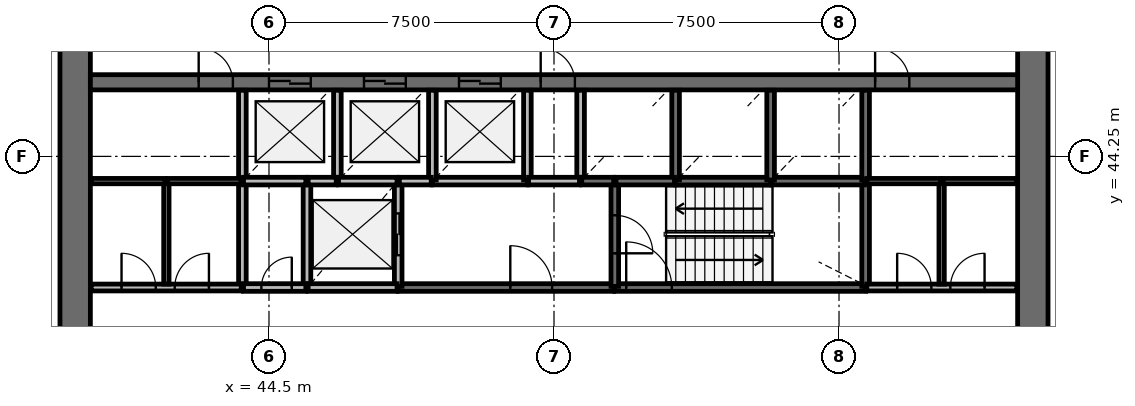
"""IFC4 building model, lengths in metres.
Left out: names, types, materials, properties, quantities, classifications, styles, units other than length and angle.
Written with IfcOpenShell. Run it as: python <this file> out.ifc"""

import sys

from ifc_helpers import new_model, si_unit, direction, frame, frame_2d, origin, place, context, subcontext, project, spatial, rectangle, extrude, source, transform, mapped, element, fill, save


model = new_model("IFC4")
c1 = context("Model", 3, precision=1e-05, world=origin(), true_north=direction((0.0, 1.0)))
c2 = subcontext(c1, "Body", "Model", "MODEL_VIEW")
j1 = project(units=[si_unit("LENGTHUNIT", "METRE"), si_unit("PLANEANGLEUNIT", "RADIAN")], contexts=[c1])
p1 = place(None, origin())
s1 = spatial("IfcSite", under=j1, at=p1, CompositionType="ELEMENT")
p2 = place(p1, origin())
s2 = spatial("IfcBuilding", under=s1, at=p2, CompositionType="ELEMENT")
p3 = place(p2, frame((0.0, 0.0, 88.0)))
s3 = spatial("IfcBuildingStorey", under=s2, at=p3, CompositionType="ELEMENT", Elevation=88.0)
p4 = place(p3, frame((64.6, 38.0, 0.0), z_axis=(0.0, 0.0, 1.0), x_axis=(0.0, 1.0, 0.0)))
e1 = element("IfcWall", 1, at=p4, inside=s3, PredefinedType="SHEAR", context=c2, shape_type="SweptSolid", body=[
    extrude(rectangle(XDim=20.0, YDim=0.8, at=frame_2d((10.0, 0.0))), origin(), (0.0, 0.0, 1.0), 4.1),
])
p5 = place(p4, frame((9.1, 0.0, 0.0)))
e2 = element("IfcOpeningElement", 2, at=p5, cuts=e1, PredefinedType="OPENING", context=c2, shape_type="SweptSolid", body=[
    extrude(rectangle(XDim=1.8, YDim=2.1, at=frame_2d((0.9, 1.05))), frame((0.0, 0.41, 0.0), z_axis=(0.0, -1.0, 0.0), x_axis=(1.0, 0.0, 0.0)), (0.0, 0.0, 1.0), 0.82),
])
p6 = place(p3, frame((39.4, 58.0, 0.0), z_axis=(0.0, 0.0, 1.0), x_axis=(0.0, -1.0, 0.0)))
e3 = element("IfcWall", 3, at=p6, inside=s3, PredefinedType="SHEAR", context=c2, shape_type="SweptSolid", body=[
    extrude(rectangle(XDim=20.0, YDim=0.8, at=frame_2d((10.0, 0.0))), origin(), (0.0, 0.0, 1.0), 4.1),
])
p7 = place(p6, frame((9.1, 0.0, 0.0)))
e4 = element("IfcOpeningElement", 4, at=p7, cuts=e3, PredefinedType="OPENING", context=c2, shape_type="SweptSolid", body=[
    extrude(rectangle(XDim=1.8, YDim=2.1, at=frame_2d((0.9, 1.05))), frame((0.0, 0.41, 0.0), z_axis=(0.0, -1.0, 0.0), x_axis=(1.0, 0.0, 0.0)), (0.0, 0.0, 1.0), 0.82),
])
p8 = place(p3, frame((39.8, 46.2, 0.0), z_axis=(0.0, 0.0, 1.0), x_axis=(1.0, 0.0, 0.0)))
e5 = element("IfcWall", 5, at=p8, inside=s3, PredefinedType="SHEAR", context=c2, shape_type="SweptSolid", body=[
    extrude(rectangle(XDim=24.4, YDim=0.4, at=frame_2d((12.2, 0.0))), origin(), (0.0, 0.0, 1.0), 4.1),
])
p9 = place(p8, frame((4.7, 0.0, 0.0)))
e6 = element("IfcOpeningElement", 6, at=p9, cuts=e5, PredefinedType="OPENING", context=c2, shape_type="SweptSolid", body=[
    extrude(rectangle(XDim=1.1, YDim=2.1, at=frame_2d((0.55, 1.05))), frame((0.0, 0.21, 0.0), z_axis=(0.0, -1.0, 0.0), x_axis=(1.0, 0.0, 0.0)), (0.0, 0.0, 1.0), 0.42),
])
p10 = place(p8, frame((7.2, 0.0, 0.0)))
e7 = element("IfcOpeningElement", 7, at=p10, cuts=e5, PredefinedType="OPENING", context=c2, shape_type="SweptSolid", body=[
    extrude(rectangle(XDim=1.1, YDim=2.1, at=frame_2d((0.55, 1.05))), frame((0.0, 0.21, 0.0), z_axis=(0.0, -1.0, 0.0), x_axis=(1.0, 0.0, 0.0)), (0.0, 0.0, 1.0), 0.42),
])
p11 = place(p8, frame((9.7, 0.0, 0.0)))
e8 = element("IfcOpeningElement", 8, at=p11, cuts=e5, PredefinedType="OPENING", context=c2, shape_type="SweptSolid", body=[
    extrude(rectangle(XDim=1.1, YDim=2.1, at=frame_2d((0.55, 1.05))), frame((0.0, 0.21, 0.0), z_axis=(0.0, -1.0, 0.0), x_axis=(1.0, 0.0, 0.0)), (0.0, 0.0, 1.0), 0.42),
])
p12 = place(p8, frame((20.65, 0.0, 0.0)))
e9 = element("IfcOpeningElement", 9, at=p12, cuts=e5, PredefinedType="OPENING", context=c2, shape_type="SweptSolid", body=[
    extrude(rectangle(XDim=0.9, YDim=2.1, at=frame_2d((0.45, 1.05))), frame((0.0, 0.21, 0.0), z_axis=(0.0, -1.0, 0.0), x_axis=(1.0, 0.0, 0.0)), (0.0, 0.0, 1.0), 0.42),
])
p13 = place(p8, frame((2.85, 0.0, 0.0)))
e10 = element("IfcOpeningElement", 10, at=p13, cuts=e5, PredefinedType="OPENING", context=c2, shape_type="SweptSolid", body=[
    extrude(rectangle(XDim=0.9, YDim=2.1, at=frame_2d((0.45, 1.05))), frame((0.0, 0.21, 0.0), z_axis=(0.0, -1.0, 0.0), x_axis=(1.0, 0.0, 0.0)), (0.0, 0.0, 1.0), 0.42),
])
p14 = place(p8, frame((11.85, 0.0, 0.0)))
e11 = element("IfcOpeningElement", 11, at=p14, cuts=e5, PredefinedType="OPENING", context=c2, shape_type="SweptSolid", body=[
    extrude(rectangle(XDim=0.9, YDim=2.1, at=frame_2d((0.45, 1.05))), frame((0.0, 0.21, 0.0), z_axis=(0.0, -1.0, 0.0), x_axis=(1.0, 0.0, 0.0)), (0.0, 0.0, 1.0), 0.42),
])
p15 = place(p3, frame((53.6, 40.8, 0.0), z_axis=(0.0, 0.0, 1.0), x_axis=(1.0, 0.0, 0.0)))
e12 = element("IfcWall", 12, at=p15, inside=s3, PredefinedType="SOLIDWALL", context=c2, shape_type="SweptSolid", body=[
    extrude(rectangle(XDim=6.6, YDim=0.2, at=frame_2d((3.3, 0.0))), origin(), (0.0, 0.0, 1.0), 3.7),
])
p16 = place(p15, frame((0.3, 0.0, 0.0)))
e13 = element("IfcOpeningElement", 13, at=p16, cuts=e12, PredefinedType="OPENING", context=c2, shape_type="SweptSolid", body=[
    extrude(rectangle(XDim=1.2, YDim=2.1, at=frame_2d((0.6, 1.05))), frame((0.0, 0.11, 0.0), z_axis=(0.0, -1.0, 0.0), x_axis=(1.0, 0.0, 0.0)), (0.0, 0.0, 1.0), 0.22),
])
p17 = place(p3, frame((47.9, 40.8, 0.0), z_axis=(0.0, 0.0, 1.0), x_axis=(1.0, 0.0, 0.0)))
e14 = element("IfcWall", 14, at=p17, inside=s3, PredefinedType="SOLIDWALL", context=c2, shape_type="SweptSolid", body=[
    extrude(rectangle(XDim=5.67, YDim=0.2, at=frame_2d((2.835, 0.0))), origin(), (0.0, 0.0, 1.0), 3.7),
])
p18 = place(p17, frame((2.95, 0.0, 0.0)))
e15 = element("IfcOpeningElement", 15, at=p18, cuts=e14, PredefinedType="OPENING", context=c2, shape_type="SweptSolid", body=[
    extrude(rectangle(XDim=1.1, YDim=2.1, at=frame_2d((0.55, 1.05))), frame((0.0, 0.11, 0.0), z_axis=(0.0, -1.0, 0.0), x_axis=(1.0, 0.0, 0.0)), (0.0, 0.0, 1.0), 0.22),
])
for number, where, z_axis, x_axis in (
    (16, (43.8, 43.6, 0.0), (0.0, 0.0, 1.0), (0.0, -1.0, 0.0)),
    (17, (45.5, 43.6, 0.0), (0.0, 0.0, 1.0), (0.0, -1.0, 0.0)),
):
    element("IfcWall", number, at=place(p3, frame(where, z_axis=z_axis, x_axis=x_axis)), inside=s3, PredefinedType="SOLIDWALL", context=c2, shape_type="SweptSolid", body=[
        extrude(rectangle(XDim=2.8, YDim=0.2, at=frame_2d((1.4, 0.0))), origin(), (0.0, 0.0, 1.0), 3.7),
    ])
p19 = place(p3, frame((47.9, 40.83, 0.0), z_axis=(0.0, 0.0, 1.0), x_axis=(0.0, 1.0, 0.0)))
e18 = element("IfcWall", 18, at=p19, inside=s3, PredefinedType="SOLIDWALL", context=c2, shape_type="SweptSolid", body=[
    extrude(rectangle(XDim=2.77, YDim=0.2, at=frame_2d((1.385, 0.0))), origin(), (0.0, 0.0, 1.0), 3.7),
])
p20 = place(p19, frame((0.82, 0.0, 0.0)))
e19 = element("IfcOpeningElement", 19, at=p20, cuts=e18, PredefinedType="OPENING", context=c2, shape_type="SweptSolid", body=[
    extrude(rectangle(XDim=1.1, YDim=2.1, at=frame_2d((0.55, 1.05))), frame((0.0, 0.11, 0.0), z_axis=(0.0, -1.0, 0.0), x_axis=(1.0, 0.0, 0.0)), (0.0, 0.0, 1.0), 0.22),
])
p21 = place(p3, frame((60.2, 40.83, 0.0), z_axis=(0.0, 0.0, 1.0), x_axis=(0.0, 1.0, 0.0)))
e20 = element("IfcWall", 20, at=p21, inside=s3, PredefinedType="SOLIDWALL", context=c2, shape_type="SweptSolid", body=[
    extrude(rectangle(XDim=2.77, YDim=0.2, at=frame_2d((1.385, 0.0))), origin(), (0.0, 0.0, 1.0), 3.7),
])
p22 = place(p3, frame((53.6, 43.6, 0.0), z_axis=(0.0, 0.0, 1.0), x_axis=(0.0, -1.0, 0.0)))
e21 = element("IfcWall", 21, at=p22, inside=s3, PredefinedType="SOLIDWALL", context=c2, shape_type="SweptSolid", body=[
    extrude(rectangle(XDim=2.77, YDim=0.2, at=frame_2d((1.385, 0.0))), origin(), (0.0, 0.0, 1.0), 3.7),
])
p23 = place(p22, frame((0.9, 0.0, 0.0)))
e22 = element("IfcOpeningElement", 22, at=p23, cuts=e21, PredefinedType="OPENING", context=c2, shape_type="SweptSolid", body=[
    extrude(rectangle(XDim=1.0, YDim=2.1, at=frame_2d((0.5, 1.05))), frame((0.0, 0.11, 0.0), z_axis=(0.0, -1.0, 0.0), x_axis=(1.0, 0.0, 0.0)), (0.0, 0.0, 1.0), 0.22),
])
for number, where, z_axis, x_axis in (
    (23, (48.8, 43.6, 0.0), (0.0, 0.0, 1.0), (1.0, 0.0, 0.0)),
    (24, (55.2, 43.6, 0.0), (0.0, 0.0, 1.0), (1.0, 0.0, 0.0)),
):
    element("IfcWall", number, at=place(p3, frame(where, z_axis=z_axis, x_axis=x_axis)), inside=s3, PredefinedType="SOLIDWALL", context=c2, shape_type="SweptSolid", body=[
        extrude(rectangle(XDim=2.5, YDim=0.2, at=frame_2d((1.25, 0.0))), origin(), (0.0, 0.0, 1.0), 3.7),
    ])
p24 = place(p3, frame((57.73, 43.6, 0.0), z_axis=(0.0, 0.0, 1.0), x_axis=(1.0, 0.0, 0.0)))
e25 = element("IfcWall", 25, at=p24, inside=s3, PredefinedType="SOLIDWALL", context=c2, shape_type="SweptSolid", body=[
    extrude(rectangle(XDim=2.44, YDim=0.2, at=frame_2d((1.22, 0.0))), origin(), (0.0, 0.0, 1.0), 3.7),
])
p25 = place(p3, frame((45.53, 40.8, 0.0), z_axis=(0.0, 0.0, 1.0), x_axis=(1.0, 0.0, 0.0)))
e26 = element("IfcWall", 26, at=p25, inside=s3, PredefinedType="SOLIDWALL", context=c2, shape_type="SweptSolid", body=[
    extrude(rectangle(XDim=2.34, YDim=0.2, at=frame_2d((1.17, 0.0))), origin(), (0.0, 0.0, 1.0), 3.7),
])
p26 = place(p3, frame((43.8, 45.99, 0.0), z_axis=(0.0, 0.0, 1.0), x_axis=(0.0, -1.0, 0.0)))
e27 = element("IfcWall", 27, at=p26, inside=s3, PredefinedType="SOLIDWALL", context=c2, shape_type="SweptSolid", body=[
    extrude(rectangle(XDim=2.36, YDim=0.2, at=frame_2d((1.18, 0.0))), origin(), (0.0, 0.0, 1.0), 3.7),
])
p27 = place(p3, frame((46.3, 43.6, 0.0), z_axis=(0.0, 0.0, 1.0), x_axis=(0.0, 1.0, 0.0)))
e28 = element("IfcWall", 28, at=p27, inside=s3, PredefinedType="SOLIDWALL", context=c2, shape_type="SweptSolid", body=[
    extrude(rectangle(XDim=2.39, YDim=0.2, at=frame_2d((1.195, 0.0))), origin(), (0.0, 0.0, 1.0), 3.7),
])
for number, where, z_axis, x_axis in (
    (29, (48.8, 43.63, 0.0), (0.0, 0.0, 1.0), (0.0, 1.0, 0.0)),
    (30, (51.3, 43.63, 0.0), (0.0, 0.0, 1.0), (0.0, 1.0, 0.0)),
):
    element("IfcWall", number, at=place(p3, frame(where, z_axis=z_axis, x_axis=x_axis)), inside=s3, PredefinedType="SOLIDWALL", context=c2, shape_type="SweptSolid", body=[
        extrude(rectangle(XDim=2.36, YDim=0.2, at=frame_2d((1.18, 0.0))), origin(), (0.0, 0.0, 1.0), 3.7),
    ])
p28 = place(p3, frame((52.7, 45.99, 0.0), z_axis=(0.0, 0.0, 1.0), x_axis=(0.0, -1.0, 0.0)))
e31 = element("IfcWall", 31, at=p28, inside=s3, PredefinedType="SOLIDWALL", context=c2, shape_type="SweptSolid", body=[
    extrude(rectangle(XDim=2.39, YDim=0.2, at=frame_2d((1.195, 0.0))), origin(), (0.0, 0.0, 1.0), 3.7),
])
for number, where, z_axis, x_axis in (
    (32, (55.2, 43.63, 0.0), (0.0, 0.0, 1.0), (0.0, 1.0, 0.0)),
    (33, (57.7, 43.63, 0.0), (0.0, 0.0, 1.0), (0.0, 1.0, 0.0)),
    (34, (60.2, 43.63, 0.0), (0.0, 0.0, 1.0), (0.0, 1.0, 0.0)),
):
    element("IfcWall", number, at=place(p3, frame(where, z_axis=z_axis, x_axis=x_axis)), inside=s3, PredefinedType="SOLIDWALL", context=c2, shape_type="SweptSolid", body=[
        extrude(rectangle(XDim=2.36, YDim=0.2, at=frame_2d((1.18, 0.0))), origin(), (0.0, 0.0, 1.0), 3.7),
    ])
p29 = place(p3, frame((43.83, 43.6, 0.0), z_axis=(0.0, 0.0, 1.0), x_axis=(1.0, 0.0, 0.0)))
e35 = element("IfcWall", 35, at=p29, inside=s3, PredefinedType="SOLIDWALL", context=c2, shape_type="SweptSolid", body=[
    extrude(rectangle(XDim=1.64, YDim=0.2, at=frame_2d((0.82, 0.0))), origin(), (0.0, 0.0, 1.0), 3.7),
])
p30 = place(p3, frame((43.83, 40.8, 0.0), z_axis=(0.0, 0.0, 1.0), x_axis=(1.0, 0.0, 0.0)))
e36 = element("IfcWall", 36, at=p30, inside=s3, PredefinedType="SOLIDWALL", context=c2, shape_type="SweptSolid", body=[
    extrude(rectangle(XDim=1.64, YDim=0.2, at=frame_2d((0.82, 0.0))), origin(), (0.0, 0.0, 1.0), 3.7),
])
p31 = place(p30, frame((0.47, 0.0, 0.0)))
e37 = element("IfcOpeningElement", 37, at=p31, cuts=e36, PredefinedType="OPENING", context=c2, shape_type="SweptSolid", body=[
    extrude(rectangle(XDim=0.8, YDim=2.1, at=frame_2d((0.4, 1.05))), frame((0.0, 0.11, 0.0), z_axis=(0.0, -1.0, 0.0), x_axis=(1.0, 0.0, 0.0)), (0.0, 0.0, 1.0), 0.22),
])
for number, where, z_axis, x_axis in (
    (38, (46.33, 43.6, 0.0), (0.0, 0.0, 1.0), (1.0, 0.0, 0.0)),
    (39, (53.63, 43.6, 0.0), (0.0, 0.0, 1.0), (1.0, 0.0, 0.0)),
):
    element("IfcWall", number, at=place(p3, frame(where, z_axis=z_axis, x_axis=x_axis)), inside=s3, PredefinedType="SOLIDWALL", context=c2, shape_type="SweptSolid", body=[
        extrude(rectangle(XDim=1.54, YDim=0.2, at=frame_2d((0.77, 0.0))), origin(), (0.0, 0.0, 1.0), 3.7),
    ])
p32 = place(p3, frame((52.67, 43.6, 0.0), z_axis=(0.0, 0.0, 1.0), x_axis=(-1.0, 0.0, 0.0)))
e40 = element("IfcWall", 40, at=p32, inside=s3, PredefinedType="SOLIDWALL", context=c2, shape_type="SweptSolid", body=[
    extrude(rectangle(XDim=1.34, YDim=0.2, at=frame_2d((0.67, 0.0))), origin(), (0.0, 0.0, 1.0), 3.7),
])
for number, where, z_axis, x_axis in (
    (41, (47.93, 43.6, 0.0), (0.0, 0.0, 1.0), (1.0, 0.0, 0.0)),
    (42, (52.73, 43.6, 0.0), (0.0, 0.0, 1.0), (1.0, 0.0, 0.0)),
):
    element("IfcWall", number, at=place(p3, frame(where, z_axis=z_axis, x_axis=x_axis)), inside=s3, PredefinedType="SOLIDWALL", context=c2, shape_type="SweptSolid", body=[
        extrude(rectangle(XDim=0.84, YDim=0.2, at=frame_2d((0.42, 0.0))), origin(), (0.0, 0.0, 1.0), 3.7),
    ])
p33 = place(p3, frame((45.53, 43.6, 0.0), z_axis=(0.0, 0.0, 1.0), x_axis=(1.0, 0.0, 0.0)))
e43 = element("IfcWall", 43, at=p33, inside=s3, PredefinedType="SOLIDWALL", context=c2, shape_type="SweptSolid", body=[
    extrude(rectangle(XDim=0.74, YDim=0.2, at=frame_2d((0.37, 0.0))), origin(), (0.0, 0.0, 1.0), 3.7),
])
p34 = place(p3, frame((60.23, 40.8, 0.0), z_axis=(0.0, 0.0, 1.0), x_axis=(1.0, 0.0, 0.0)))
e44 = element("IfcWall", 44, at=p34, inside=s3, PredefinedType="PARTITIONING", context=c2, shape_type="SweptSolid", body=[
    extrude(rectangle(XDim=3.95, YDim=0.18, at=frame_2d((1.975, 0.0))), origin(), (0.0, 0.0, 1.0), 3.7),
])
p35 = place(p34, frame((0.8, 0.0, 0.0)))
e45 = element("IfcOpeningElement", 45, at=p35, cuts=e44, PredefinedType="OPENING", context=c2, shape_type="SweptSolid", body=[
    extrude(rectangle(XDim=0.9, YDim=2.1, at=frame_2d((0.45, 1.05))), frame((0.0, 0.1, 0.0), z_axis=(0.0, -1.0, 0.0), x_axis=(1.0, 0.0, 0.0)), (0.0, 0.0, 1.0), 0.2),
])
p36 = place(p34, frame((2.2, 0.0, 0.0)))
e46 = element("IfcOpeningElement", 46, at=p36, cuts=e44, PredefinedType="OPENING", context=c2, shape_type="SweptSolid", body=[
    extrude(rectangle(XDim=0.9, YDim=2.1, at=frame_2d((0.45, 1.05))), frame((0.0, 0.1, 0.0), z_axis=(0.0, -1.0, 0.0), x_axis=(1.0, 0.0, 0.0)), (0.0, 0.0, 1.0), 0.2),
])
p37 = place(p3, frame((39.82, 40.8, 0.0), z_axis=(0.0, 0.0, 1.0), x_axis=(1.0, 0.0, 0.0)))
e47 = element("IfcWall", 47, at=p37, inside=s3, PredefinedType="PARTITIONING", context=c2, shape_type="SweptSolid", body=[
    extrude(rectangle(XDim=3.95, YDim=0.18, at=frame_2d((1.975, 0.0))), origin(), (0.0, 0.0, 1.0), 3.7),
])
p38 = place(p37, frame((0.8, 0.0, 0.0)))
e48 = element("IfcOpeningElement", 48, at=p38, cuts=e47, PredefinedType="OPENING", context=c2, shape_type="SweptSolid", body=[
    extrude(rectangle(XDim=0.9, YDim=2.1, at=frame_2d((0.45, 1.05))), frame((0.0, 0.1, 0.0), z_axis=(0.0, -1.0, 0.0), x_axis=(1.0, 0.0, 0.0)), (0.0, 0.0, 1.0), 0.2),
])
p39 = place(p37, frame((2.2, 0.0, 0.0)))
e49 = element("IfcOpeningElement", 49, at=p39, cuts=e47, PredefinedType="OPENING", context=c2, shape_type="SweptSolid", body=[
    extrude(rectangle(XDim=0.9, YDim=2.1, at=frame_2d((0.45, 1.05))), frame((0.0, 0.1, 0.0), z_axis=(0.0, -1.0, 0.0), x_axis=(1.0, 0.0, 0.0)), (0.0, 0.0, 1.0), 0.2),
])
for number, where, z_axis, x_axis in (
    (50, (41.8, 40.89, 0.0), (0.0, 0.0, 1.0), (0.0, 1.0, 0.0)),
    (51, (62.2, 40.89, 0.0), (0.0, 0.0, 1.0), (0.0, 1.0, 0.0)),
):
    element("IfcWall", number, at=place(p3, frame(where, z_axis=z_axis, x_axis=x_axis)), inside=s3, PredefinedType="PARTITIONING", context=c2, shape_type="SweptSolid", body=[
        extrude(rectangle(XDim=2.71, YDim=0.14, at=frame_2d((1.355, 0.0))), origin(), (0.0, 0.0, 1.0), 2.9),
    ])
for number, where, z_axis, x_axis in (
    (52, (43.77, 43.6, 0.0), (0.0, 0.0, 1.0), (-1.0, 0.0, 0.0)),
    (53, (60.23, 43.6, 0.0), (0.0, 0.0, 1.0), (1.0, 0.0, 0.0)),
):
    element("IfcWall", number, at=place(p3, frame(where, z_axis=z_axis, x_axis=x_axis)), inside=s3, PredefinedType="PARTITIONING", context=c2, shape_type="SweptSolid", body=[
        extrude(rectangle(XDim=1.94, YDim=0.14, at=frame_2d((0.97, 0.0))), origin(), (0.0, 0.0, 1.0), 2.9),
    ])
for number, where, z_axis, x_axis in (
    (54, (62.23, 43.6, 0.0), (0.0, 0.0, 1.0), (1.0, 0.0, 0.0)),
    (55, (41.77, 43.6, 0.0), (0.0, 0.0, 1.0), (-1.0, 0.0, 0.0)),
):
    element("IfcWall", number, at=place(p3, frame(where, z_axis=z_axis, x_axis=x_axis)), inside=s3, PredefinedType="PARTITIONING", context=c2, shape_type="SweptSolid", body=[
        extrude(rectangle(XDim=1.95, YDim=0.14, at=frame_2d((0.975, 0.0))), origin(), (0.0, 0.0, 1.0), 2.9),
    ])
m1 = source(origin(), c2, "Body", "SweptSolid", [
    extrude(rectangle(XDim=1.1, YDim=2.1, at=frame_2d((0.55, 1.05))), frame((0.0, 0.025, 0.0), z_axis=(0.0, -1.0, 0.0), x_axis=(1.0, 0.0, 0.0)), (0.0, 0.0, 1.0), 0.05),
])
p40 = place(p9, origin())
e56 = element("IfcDoor", 56, at=p40, inside=s3, OperationType="DOUBLE_DOOR_SLIDING", PredefinedType="USERDEFINED", context=c2, shape_type="MappedRepresentation", body=[
    mapped(m1, transform((0.0, 0.0, 0.0), scale=1.0)),
])
fill(e6, e56)
p41 = place(p10, origin())
e57 = element("IfcDoor", 57, at=p41, inside=s3, OperationType="DOUBLE_DOOR_SLIDING", PredefinedType="USERDEFINED", context=c2, shape_type="MappedRepresentation", body=[
    mapped(m1, transform((0.0, 0.0, 0.0), scale=1.0)),
])
fill(e7, e57)
p42 = place(p11, origin())
e58 = element("IfcDoor", 58, at=p42, inside=s3, OperationType="DOUBLE_DOOR_SLIDING", PredefinedType="USERDEFINED", context=c2, shape_type="MappedRepresentation", body=[
    mapped(m1, transform((0.0, 0.0, 0.0), scale=1.0)),
])
fill(e8, e58)
p43 = place(p20, origin())
e59 = element("IfcDoor", 59, at=p43, inside=s3, OperationType="DOUBLE_DOOR_SLIDING", PredefinedType="USERDEFINED", context=c2, shape_type="MappedRepresentation", body=[
    mapped(m1, transform((0.0, 0.0, 0.0), scale=1.0)),
])
fill(e19, e59)
m2 = source(origin(), c2, "Body", "SweptSolid", [
    extrude(rectangle(XDim=1.2, YDim=2.1, at=frame_2d((0.6, 1.05))), frame((0.0, 0.025, 0.0), z_axis=(0.0, -1.0, 0.0), x_axis=(1.0, 0.0, 0.0)), (0.0, 0.0, 1.0), 0.05),
])
p44 = place(p16, origin())
e60 = element("IfcDoor", 60, at=p44, inside=s3, OperationType="SINGLE_SWING_LEFT", PredefinedType="DOOR", context=c2, shape_type="MappedRepresentation", body=[
    mapped(m2, transform((0.0, 0.0, 0.0), scale=1.0)),
])
fill(e13, e60)
m3 = source(origin(), c2, "Body", "SweptSolid", [
    extrude(rectangle(XDim=1.0, YDim=2.1, at=frame_2d((0.5, 1.05))), frame((0.0, 0.025, 0.0), z_axis=(0.0, -1.0, 0.0), x_axis=(1.0, 0.0, 0.0)), (0.0, 0.0, 1.0), 0.05),
])
p45 = place(p23, origin())
e61 = element("IfcDoor", 61, at=p45, inside=s3, OperationType="SINGLE_SWING_RIGHT", PredefinedType="DOOR", context=c2, shape_type="MappedRepresentation", body=[
    mapped(m3, transform((0.0, 0.0, 0.0), scale=1.0)),
])
fill(e22, e61)
m4 = source(origin(), c2, "Body", "SweptSolid", [
    extrude(rectangle(XDim=1.1, YDim=2.1, at=frame_2d((0.55, 1.05))), frame((0.0, 0.025, 0.0), z_axis=(0.0, -1.0, 0.0), x_axis=(1.0, 0.0, 0.0)), (0.0, 0.0, 1.0), 0.05),
])
p46 = place(p18, origin())
e62 = element("IfcDoor", 62, at=p46, inside=s3, OperationType="SINGLE_SWING_LEFT", PredefinedType="DOOR", context=c2, shape_type="MappedRepresentation", body=[
    mapped(m4, transform((0.0, 0.0, 0.0), scale=1.0)),
])
fill(e15, e62)
m5 = source(origin(), c2, "Body", "SweptSolid", [
    extrude(rectangle(XDim=0.8, YDim=2.1, at=frame_2d((0.4, 1.05))), frame((0.0, 0.025, 0.0), z_axis=(0.0, -1.0, 0.0), x_axis=(1.0, 0.0, 0.0)), (0.0, 0.0, 1.0), 0.05),
])
p47 = place(p31, origin())
e63 = element("IfcDoor", 63, at=p47, inside=s3, OperationType="SINGLE_SWING_RIGHT", PredefinedType="DOOR", context=c2, shape_type="MappedRepresentation", body=[
    mapped(m5, transform((0.0, 0.0, 0.0), scale=1.0)),
])
fill(e37, e63)
m6 = source(origin(), c2, "Body", "SweptSolid", [
    extrude(rectangle(XDim=0.9, YDim=2.1, at=frame_2d((0.45, 1.05))), frame((0.0, 0.025, 0.0), z_axis=(0.0, -1.0, 0.0), x_axis=(1.0, 0.0, 0.0)), (0.0, 0.0, 1.0), 0.05),
])
p48 = place(p38, origin())
e64 = element("IfcDoor", 64, at=p48, inside=s3, OperationType="SINGLE_SWING_LEFT", PredefinedType="DOOR", context=c2, shape_type="MappedRepresentation", body=[
    mapped(m6, transform((0.0, 0.0, 0.0), scale=1.0)),
])
fill(e48, e64)
p49 = place(p39, origin())
e65 = element("IfcDoor", 65, at=p49, inside=s3, OperationType="SINGLE_SWING_RIGHT", PredefinedType="DOOR", context=c2, shape_type="MappedRepresentation", body=[
    mapped(m6, transform((0.0, 0.0, 0.0), scale=1.0)),
])
fill(e49, e65)
p50 = place(p12, origin())
e66 = element("IfcDoor", 66, at=p50, inside=s3, OperationType="SINGLE_SWING_LEFT", PredefinedType="DOOR", context=c2, shape_type="MappedRepresentation", body=[
    mapped(m6, transform((0.0, 0.0, 0.0), scale=1.0)),
])
fill(e9, e66)
p51 = place(p35, origin())
e67 = element("IfcDoor", 67, at=p51, inside=s3, OperationType="SINGLE_SWING_LEFT", PredefinedType="DOOR", context=c2, shape_type="MappedRepresentation", body=[
    mapped(m6, transform((0.0, 0.0, 0.0), scale=1.0)),
])
fill(e45, e67)
p52 = place(p36, origin())
e68 = element("IfcDoor", 68, at=p52, inside=s3, OperationType="SINGLE_SWING_RIGHT", PredefinedType="DOOR", context=c2, shape_type="MappedRepresentation", body=[
    mapped(m6, transform((0.0, 0.0, 0.0), scale=1.0)),
])
fill(e46, e68)
p53 = place(p13, origin())
e69 = element("IfcDoor", 69, at=p53, inside=s3, OperationType="SINGLE_SWING_LEFT", PredefinedType="DOOR", context=c2, shape_type="MappedRepresentation", body=[
    mapped(m6, transform((0.0, 0.0, 0.0), scale=1.0)),
])
fill(e10, e69)
p54 = place(p14, origin())
e70 = element("IfcDoor", 70, at=p54, inside=s3, OperationType="SINGLE_SWING_LEFT", PredefinedType="DOOR", context=c2, shape_type="MappedRepresentation", body=[
    mapped(m6, transform((0.0, 0.0, 0.0), scale=1.0)),
])
fill(e11, e70)
save(model, sys.argv[1])
